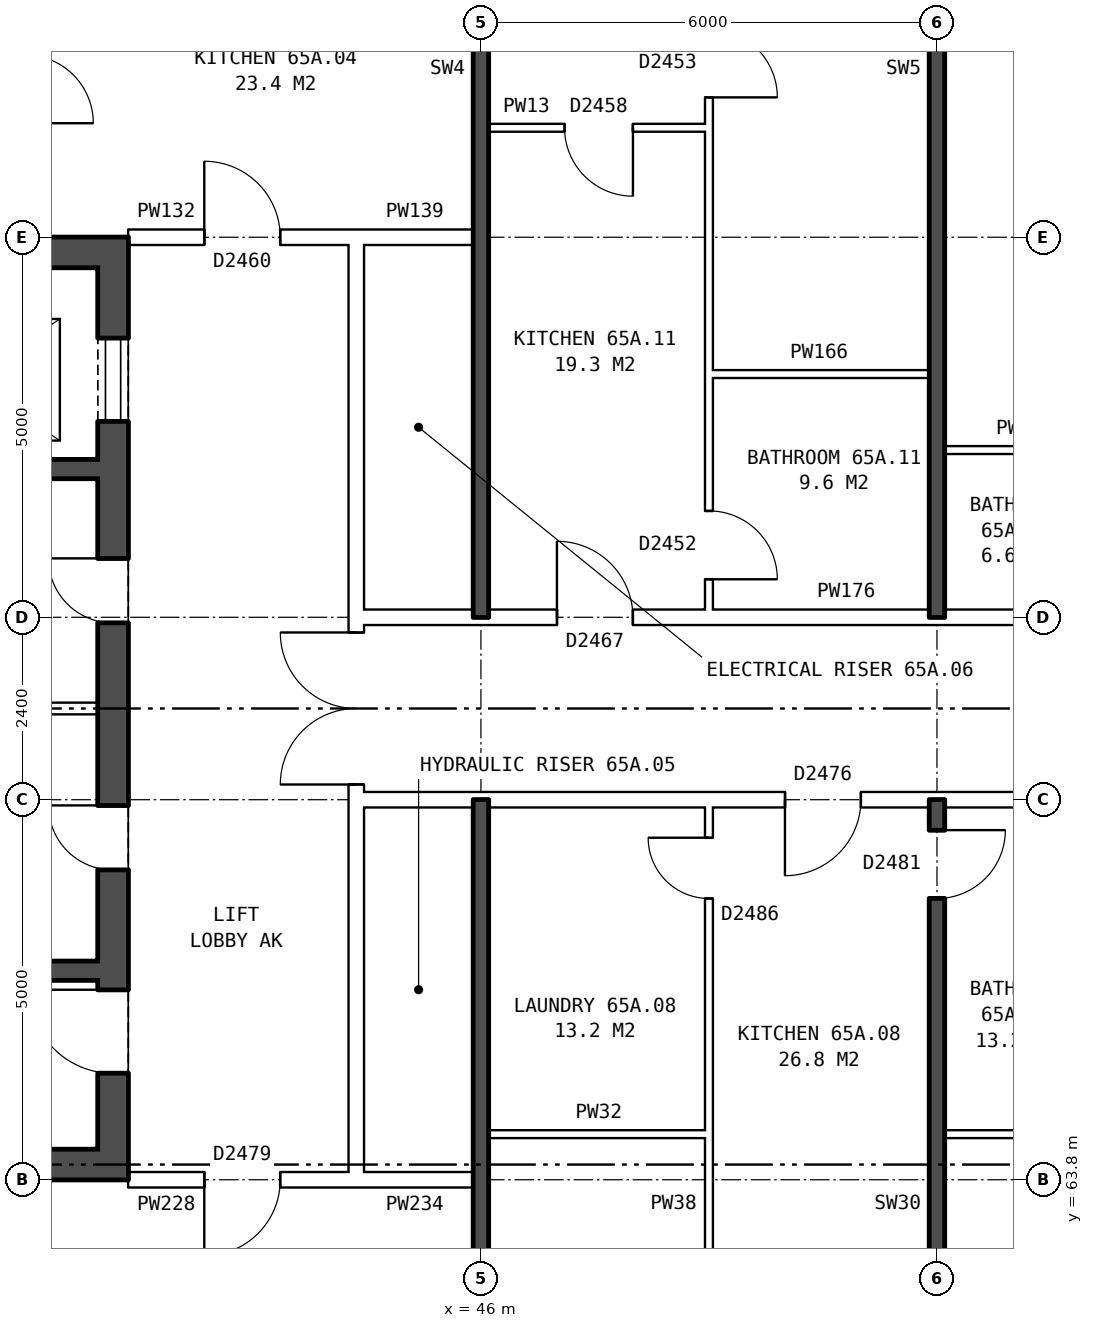
"""IFC4 building model, lengths in metres.
Left out: names, types, materials, properties, quantities, classifications, styles, units other than length and angle.
Written with IfcOpenShell. Run it as: python <this file> out.ifc"""

import sys

from ifc_helpers import new_model, si_unit, direction, frame, frame_2d, origin, place, context, subcontext, project, spatial, rectangle, extrude, element, fill, save


model = new_model("IFC4")
c1 = context("Model", 3, precision=1e-05, world=origin(), true_north=direction((0.0, 1.0)))
c2 = subcontext(c1, "Body", "Model", "MODEL_VIEW")
j1 = project(units=[si_unit("LENGTHUNIT", "METRE"), si_unit("PLANEANGLEUNIT", "RADIAN")], contexts=[c1])
p1 = place(None, origin())
s1 = spatial("IfcSite", under=j1, at=p1, CompositionType="ELEMENT")
p2 = place(p1, origin())
s2 = spatial("IfcBuilding", under=s1, at=p2, CompositionType="ELEMENT")
p3 = place(p2, frame((0.0, 0.0, 230.7)))
s3 = spatial("IfcBuildingStorey", under=s2, at=p3, CompositionType="ELEMENT", Elevation=230.7)
p4 = place(p3, frame((41.16, 76.2, 0.0), z_axis=(0.0, 0.0, 1.0), x_axis=(0.0, -1.0, 0.0)))
e1 = element("IfcWall", 1, at=p4, inside=s3, PredefinedType="SHEAR", context=c2, shape_type="SweptSolid", body=[
    extrude(rectangle(XDim=12.4, YDim=0.4, at=frame_2d((6.2, 0.0))), origin(), (0.0, 0.0, 1.0), 2.85),
])
p5 = place(p4, frame((1.325, 0.0, 0.0)))
e2 = element("IfcOpeningElement", 2, at=p5, cuts=e1, PredefinedType="OPENING", context=c2, shape_type="SweptSolid", body=[
    extrude(rectangle(XDim=1.1, YDim=2.1, at=frame_2d((0.55, 1.05))), frame((0.0, 0.21, 0.0), z_axis=(0.0, -1.0, 0.0), x_axis=(1.0, 0.0, 0.0)), (0.0, 0.0, 1.0), 0.42),
])
p6 = place(p4, frame((4.225, 0.0, 0.0)))
e3 = element("IfcOpeningElement", 3, at=p6, cuts=e1, PredefinedType="OPENING", context=c2, shape_type="SweptSolid", body=[
    extrude(rectangle(XDim=0.85, YDim=2.1, at=frame_2d((0.425, 1.05))), frame((0.0, 0.21, 0.0), z_axis=(0.0, -1.0, 0.0), x_axis=(1.0, 0.0, 0.0)), (0.0, 0.0, 1.0), 0.42),
])
p7 = place(p4, frame((7.475, 0.0, 0.0)))
e4 = element("IfcOpeningElement", 4, at=p7, cuts=e1, PredefinedType="OPENING", context=c2, shape_type="SweptSolid", body=[
    extrude(rectangle(XDim=0.85, YDim=2.1, at=frame_2d((0.425, 1.05))), frame((0.0, 0.21, 0.0), z_axis=(0.0, -1.0, 0.0), x_axis=(1.0, 0.0, 0.0)), (0.0, 0.0, 1.0), 0.42),
])
p8 = place(p4, frame((9.9, 0.0, 0.0)))
e5 = element("IfcOpeningElement", 5, at=p8, cuts=e1, PredefinedType="OPENING", context=c2, shape_type="SweptSolid", body=[
    extrude(rectangle(XDim=1.1, YDim=2.1, at=frame_2d((0.55, 1.05))), frame((0.0, 0.21, 0.0), z_axis=(0.0, -1.0, 0.0), x_axis=(1.0, 0.0, 0.0)), (0.0, 0.0, 1.0), 0.42),
])
for number, where, z_axis, x_axis in (
    (6, (40.96, 76.0, 0.0), (0.0, 0.0, 1.0), (-1.0, 0.0, 0.0)),
    (7, (40.96, 64.0, 0.0), (0.0, 0.0, 1.0), (-1.0, 0.0, 0.0)),
):
    element("IfcWall", number, at=place(p3, frame(where, z_axis=z_axis, x_axis=x_axis)), inside=s3, PredefinedType="SHEAR", context=c2, shape_type="SweptSolid", body=[
        extrude(rectangle(XDim=8.2, YDim=0.4, at=frame_2d((4.1, 0.0))), origin(), (0.0, 0.0, 1.0), 2.85),
    ])
p9 = place(p3, frame((40.96, 73.15, 0.0), z_axis=(0.0, 0.0, 1.0), x_axis=(-1.0, 0.0, 0.0)))
e8 = element("IfcWall", 8, at=p9, inside=s3, PredefinedType="SHEAR", context=c2, shape_type="SweptSolid", body=[
    extrude(rectangle(XDim=3.595, YDim=0.25, at=frame_2d((1.797, 0.0))), origin(), (0.0, 0.0, 1.0), 2.85),
])
p10 = place(p3, frame((40.96, 70.0, 0.0), z_axis=(0.0, 0.0, 1.0), x_axis=(-1.0, 0.0, 0.0)))
e9 = element("IfcWall", 9, at=p10, inside=s3, PredefinedType="PARTITIONING", context=c2, shape_type="SweptSolid", body=[
    extrude(rectangle(XDim=2.525, YDim=0.15, at=frame_2d((1.262, 0.0))), origin(), (0.0, 0.0, 1.0), 2.85),
])
p11 = place(p3, frame((40.96, 66.55, 0.0), z_axis=(0.0, 0.0, 1.0), x_axis=(-1.0, 0.0, 0.0)))
e10 = element("IfcWall", 10, at=p11, inside=s3, PredefinedType="SHEAR", context=c2, shape_type="SweptSolid", body=[
    extrude(rectangle(XDim=2.525, YDim=0.25, at=frame_2d((1.262, 0.0))), origin(), (0.0, 0.0, 1.0), 2.85),
])
p12 = place(p3, frame((44.36, 63.9, 0.0), z_axis=(0.0, 0.0, 1.0), x_axis=(0.0, 1.0, 0.0)))
e11 = element("IfcWall", 11, at=p12, inside=s3, PredefinedType="PARTITIONING", context=c2, shape_type="SweptSolid", body=[
    extrude(rectangle(XDim=12.2, YDim=0.2, at=frame_2d((6.1, 0.0))), origin(), (0.0, 0.0, 1.0), 2.85),
])
p13 = place(p12, frame((5.1, 0.0, 0.0)))
e12 = element("IfcOpeningElement", 12, at=p13, cuts=e11, PredefinedType="OPENING", context=c2, shape_type="SweptSolid", body=[
    extrude(rectangle(XDim=2.0, YDim=2.1, at=frame_2d((1.0, 1.05))), frame((0.0, 0.11, 0.0), z_axis=(0.0, -1.0, 0.0), x_axis=(1.0, 0.0, 0.0)), (0.0, 0.0, 1.0), 0.22),
])
p14 = place(p3, frame((41.36, 63.8, 0.0), z_axis=(0.0, 0.0, 1.0), x_axis=(1.0, 0.0, 0.0)))
e13 = element("IfcWall", 13, at=p14, inside=s3, PredefinedType="PARTITIONING", context=c2, shape_type="SweptSolid", body=[
    extrude(rectangle(XDim=3.0, YDim=0.2, at=frame_2d((1.5, 0.0))), origin(), (0.0, 0.0, 1.0), 2.85),
])
p15 = place(p14, frame((1.0, 0.0, 0.0)))
e14 = element("IfcOpeningElement", 14, at=p15, cuts=e13, PredefinedType="OPENING", context=c2, shape_type="SweptSolid", body=[
    extrude(rectangle(XDim=1.0, YDim=2.1, at=frame_2d((0.5, 1.05))), frame((0.0, 0.11, 0.0), z_axis=(0.0, -1.0, 0.0), x_axis=(1.0, 0.0, 0.0)), (0.0, 0.0, 1.0), 0.22),
])
p16 = place(p3, frame((44.36, 63.8, 0.0), z_axis=(0.0, 0.0, 1.0), x_axis=(1.0, 0.0, 0.0)))
e15 = element("IfcWall", 15, at=p16, inside=s3, PredefinedType="PARTITIONING", context=c2, shape_type="SweptSolid", body=[
    extrude(rectangle(XDim=1.54, YDim=0.2, at=frame_2d((0.77, 0.0))), origin(), (0.0, 0.0, 1.0), 2.85),
])
p17 = place(p3, frame((46.1, 64.4, 0.0), z_axis=(0.0, 0.0, 1.0), x_axis=(1.0, 0.0, 0.0)))
e16 = element("IfcWall", 16, at=p17, inside=s3, PredefinedType="PARTITIONING", context=c2, shape_type="SweptSolid", body=[
    extrude(rectangle(XDim=2.9, YDim=0.1, at=frame_2d((1.45, 0.0))), origin(), (0.0, 0.0, 1.0), 2.85),
])
p18 = place(p3, frame((52.1, 64.4, 0.0), z_axis=(0.0, 0.0, 1.0), x_axis=(1.0, 0.0, 0.0)))
e17 = element("IfcWall", 17, at=p18, inside=s3, PredefinedType="PARTITIONING", context=c2, shape_type="SweptSolid", body=[
    extrude(rectangle(XDim=2.8, YDim=0.1, at=frame_2d((1.4, 0.0))), origin(), (0.0, 0.0, 1.0), 2.85),
])
p19 = place(p3, frame((44.36, 68.8, 0.0), z_axis=(0.0, 0.0, 1.0), x_axis=(1.0, 0.0, 0.0)))
e18 = element("IfcWall", 18, at=p19, inside=s3, PredefinedType="PARTITIONING", context=c2, shape_type="SweptSolid", body=[
    extrude(rectangle(XDim=19.28, YDim=0.2, at=frame_2d((9.64, 0.0))), origin(), (0.0, 0.0, 1.0), 2.85),
])
p20 = place(p19, frame((14.64, 0.0, 0.0)))
e19 = element("IfcOpeningElement", 19, at=p20, cuts=e18, PredefinedType="OPENING", context=c2, shape_type="SweptSolid", body=[
    extrude(rectangle(XDim=1.0, YDim=2.1, at=frame_2d((0.5, 1.05))), frame((0.0, 0.11, 0.0), z_axis=(0.0, -1.0, 0.0), x_axis=(1.0, 0.0, 0.0)), (0.0, 0.0, 1.0), 0.22),
])
p21 = place(p19, frame((5.64, 0.0, 0.0)))
e20 = element("IfcOpeningElement", 20, at=p21, cuts=e18, PredefinedType="OPENING", context=c2, shape_type="SweptSolid", body=[
    extrude(rectangle(XDim=1.0, YDim=2.1, at=frame_2d((0.5, 1.05))), frame((0.0, 0.11, 0.0), z_axis=(0.0, -1.0, 0.0), x_axis=(1.0, 0.0, 0.0)), (0.0, 0.0, 1.0), 0.22),
])
p22 = place(p3, frame((44.36, 71.2, 0.0), z_axis=(0.0, 0.0, 1.0), x_axis=(1.0, 0.0, 0.0)))
e21 = element("IfcWall", 21, at=p22, inside=s3, PredefinedType="PARTITIONING", context=c2, shape_type="SweptSolid", body=[
    extrude(rectangle(XDim=19.28, YDim=0.2, at=frame_2d((9.64, 0.0))), origin(), (0.0, 0.0, 1.0), 2.85),
])
p23 = place(p22, frame((14.64, 0.0, 0.0)))
e22 = element("IfcOpeningElement", 22, at=p23, cuts=e21, PredefinedType="OPENING", context=c2, shape_type="SweptSolid", body=[
    extrude(rectangle(XDim=1.0, YDim=2.1, at=frame_2d((0.5, 1.05))), frame((0.0, 0.11, 0.0), z_axis=(0.0, -1.0, 0.0), x_axis=(1.0, 0.0, 0.0)), (0.0, 0.0, 1.0), 0.22),
])
p24 = place(p22, frame((11.64, 0.0, 0.0)))
e23 = element("IfcOpeningElement", 23, at=p24, cuts=e21, PredefinedType="OPENING", context=c2, shape_type="SweptSolid", body=[
    extrude(rectangle(XDim=1.0, YDim=2.1, at=frame_2d((0.5, 1.05))), frame((0.0, 0.11, 0.0), z_axis=(0.0, -1.0, 0.0), x_axis=(1.0, 0.0, 0.0)), (0.0, 0.0, 1.0), 0.22),
])
p25 = place(p22, frame((2.64, 0.0, 0.0)))
e24 = element("IfcOpeningElement", 24, at=p25, cuts=e21, PredefinedType="OPENING", context=c2, shape_type="SweptSolid", body=[
    extrude(rectangle(XDim=1.0, YDim=2.1, at=frame_2d((0.5, 1.05))), frame((0.0, 0.11, 0.0), z_axis=(0.0, -1.0, 0.0), x_axis=(1.0, 0.0, 0.0)), (0.0, 0.0, 1.0), 0.22),
])
for number, where, z_axis, x_axis in (
    (25, (52.1, 73.4, 0.0), (0.0, 0.0, 1.0), (1.0, 0.0, 0.0)),
    (26, (49.0, 74.4, 0.0), (0.0, 0.0, 1.0), (1.0, 0.0, 0.0)),
):
    element("IfcWall", number, at=place(p3, frame(where, z_axis=z_axis, x_axis=x_axis)), inside=s3, PredefinedType="PARTITIONING", context=c2, shape_type="SweptSolid", body=[
        extrude(rectangle(XDim=2.9, YDim=0.1, at=frame_2d((1.45, 0.0))), origin(), (0.0, 0.0, 1.0), 2.85),
    ])
p26 = place(p3, frame((41.36, 76.2, 0.0), z_axis=(0.0, 0.0, 1.0), x_axis=(1.0, 0.0, 0.0)))
e27 = element("IfcWall", 27, at=p26, inside=s3, PredefinedType="PARTITIONING", context=c2, shape_type="SweptSolid", body=[
    extrude(rectangle(XDim=3.0, YDim=0.2, at=frame_2d((1.5, 0.0))), origin(), (0.0, 0.0, 1.0), 2.85),
])
p27 = place(p26, frame((1.0, 0.0, 0.0)))
e28 = element("IfcOpeningElement", 28, at=p27, cuts=e27, PredefinedType="OPENING", context=c2, shape_type="SweptSolid", body=[
    extrude(rectangle(XDim=1.0, YDim=2.1, at=frame_2d((0.5, 1.05))), frame((0.0, 0.11, 0.0), z_axis=(0.0, -1.0, 0.0), x_axis=(1.0, 0.0, 0.0)), (0.0, 0.0, 1.0), 0.22),
])
p28 = place(p3, frame((44.36, 76.2, 0.0), z_axis=(0.0, 0.0, 1.0), x_axis=(1.0, 0.0, 0.0)))
e29 = element("IfcWall", 29, at=p28, inside=s3, PredefinedType="PARTITIONING", context=c2, shape_type="SweptSolid", body=[
    extrude(rectangle(XDim=1.54, YDim=0.2, at=frame_2d((0.77, 0.0))), origin(), (0.0, 0.0, 1.0), 2.85),
])
p29 = place(p3, frame((46.1, 77.64, 0.0), z_axis=(0.0, 0.0, 1.0), x_axis=(1.0, 0.0, 0.0)))
e30 = element("IfcWall", 30, at=p29, inside=s3, PredefinedType="PARTITIONING", context=c2, shape_type="SweptSolid", body=[
    extrude(rectangle(XDim=2.9, YDim=0.1, at=frame_2d((1.45, 0.0))), origin(), (0.0, 0.0, 1.0), 2.85),
])
p30 = place(p29, frame((1.0, 0.0, 0.0)))
e31 = element("IfcOpeningElement", 31, at=p30, cuts=e30, PredefinedType="OPENING", context=c2, shape_type="SweptSolid", body=[
    extrude(rectangle(XDim=0.9, YDim=2.1, at=frame_2d((0.45, 1.05))), frame((0.0, 0.06, 0.0), z_axis=(0.0, -1.0, 0.0), x_axis=(1.0, 0.0, 0.0)), (0.0, 0.0, 1.0), 0.12),
])
for number, where, z_axis, x_axis in (
    (32, (46.0, 54.36, 0.0), (0.0, 0.0, 1.0), (0.0, 1.0, 0.0)),
    (33, (46.0, 71.2, 0.0), (0.0, 0.0, 1.0), (0.0, 1.0, 0.0)),
):
    element("IfcWall", number, at=place(p3, frame(where, z_axis=z_axis, x_axis=x_axis)), inside=s3, PredefinedType="SOLIDWALL", context=c2, shape_type="SweptSolid", body=[
        extrude(rectangle(XDim=14.44, YDim=0.2, at=frame_2d((7.22, 0.0))), origin(), (0.0, 0.0, 1.0), 2.85),
    ])
p31 = place(p3, frame((49.0, 54.36, 0.0), z_axis=(0.0, 0.0, 1.0), x_axis=(0.0, 1.0, 0.0)))
e34 = element("IfcWall", 34, at=p31, inside=s3, PredefinedType="PARTITIONING", context=c2, shape_type="SweptSolid", body=[
    extrude(rectangle(XDim=14.34, YDim=0.1, at=frame_2d((7.17, 0.0))), origin(), (0.0, 0.0, 1.0), 2.85),
])
p32 = place(p31, frame((4.2, 0.0, 0.0)))
e35 = element("IfcOpeningElement", 35, at=p32, cuts=e34, PredefinedType="OPENING", context=c2, shape_type="SweptSolid", body=[
    extrude(rectangle(XDim=0.9, YDim=2.1, at=frame_2d((0.45, 1.05))), frame((0.0, 0.06, 0.0), z_axis=(0.0, -1.0, 0.0), x_axis=(1.0, 0.0, 0.0)), (0.0, 0.0, 1.0), 0.12),
])
p33 = place(p31, frame((13.14, 0.0, 0.0)))
e36 = element("IfcOpeningElement", 36, at=p33, cuts=e34, PredefinedType="OPENING", context=c2, shape_type="SweptSolid", body=[
    extrude(rectangle(XDim=0.8, YDim=2.1, at=frame_2d((0.4, 1.05))), frame((0.0, 0.06, 0.0), z_axis=(0.0, -1.0, 0.0), x_axis=(1.0, 0.0, 0.0)), (0.0, 0.0, 1.0), 0.12),
])
p34 = place(p3, frame((49.0, 71.3, 0.0), z_axis=(0.0, 0.0, 1.0), x_axis=(0.0, 1.0, 0.0)))
e37 = element("IfcWall", 37, at=p34, inside=s3, PredefinedType="PARTITIONING", context=c2, shape_type="SweptSolid", body=[
    extrude(rectangle(XDim=14.34, YDim=0.1, at=frame_2d((7.17, 0.0))), origin(), (0.0, 0.0, 1.0), 2.85),
])
p35 = place(p34, frame((6.74, 0.0, 0.0)))
e38 = element("IfcOpeningElement", 38, at=p35, cuts=e37, PredefinedType="OPENING", context=c2, shape_type="SweptSolid", body=[
    extrude(rectangle(XDim=0.9, YDim=2.1, at=frame_2d((0.45, 1.05))), frame((0.0, 0.06, 0.0), z_axis=(0.0, -1.0, 0.0), x_axis=(1.0, 0.0, 0.0)), (0.0, 0.0, 1.0), 0.12),
])
p36 = place(p34, frame((0.4, 0.0, 0.0)))
e39 = element("IfcOpeningElement", 39, at=p36, cuts=e37, PredefinedType="OPENING", context=c2, shape_type="SweptSolid", body=[
    extrude(rectangle(XDim=0.9, YDim=2.1, at=frame_2d((0.45, 1.05))), frame((0.0, 0.06, 0.0), z_axis=(0.0, -1.0, 0.0), x_axis=(1.0, 0.0, 0.0)), (0.0, 0.0, 1.0), 0.12),
])
p37 = place(p3, frame((52.0, 54.36, 0.0), z_axis=(0.0, 0.0, 1.0), x_axis=(0.0, 1.0, 0.0)))
e40 = element("IfcWall", 40, at=p37, inside=s3, PredefinedType="SOLIDWALL", context=c2, shape_type="SweptSolid", body=[
    extrude(rectangle(XDim=14.44, YDim=0.2, at=frame_2d((7.22, 0.0))), origin(), (0.0, 0.0, 1.0), 2.85),
])
p38 = place(p37, frame((4.2, 0.0, 0.0)))
e41 = element("IfcOpeningElement", 41, at=p38, cuts=e40, PredefinedType="OPENING", context=c2, shape_type="SweptSolid", body=[
    extrude(rectangle(XDim=0.9, YDim=2.1, at=frame_2d((0.45, 1.05))), frame((0.0, 0.11, 0.0), z_axis=(0.0, -1.0, 0.0), x_axis=(1.0, 0.0, 0.0)), (0.0, 0.0, 1.0), 0.22),
])
p39 = place(p37, frame((13.14, 0.0, 0.0)))
e42 = element("IfcOpeningElement", 42, at=p39, cuts=e40, PredefinedType="OPENING", context=c2, shape_type="SweptSolid", body=[
    extrude(rectangle(XDim=0.9, YDim=2.1, at=frame_2d((0.45, 1.05))), frame((0.0, 0.11, 0.0), z_axis=(0.0, -1.0, 0.0), x_axis=(1.0, 0.0, 0.0)), (0.0, 0.0, 1.0), 0.22),
])
p40 = place(p3, frame((52.0, 71.2, 0.0), z_axis=(0.0, 0.0, 1.0), x_axis=(0.0, 1.0, 0.0)))
e43 = element("IfcWall", 43, at=p40, inside=s3, PredefinedType="SOLIDWALL", context=c2, shape_type="SweptSolid", body=[
    extrude(rectangle(XDim=14.44, YDim=0.2, at=frame_2d((7.22, 0.0))), origin(), (0.0, 0.0, 1.0), 2.85),
])
p41 = place(p5, origin())
e44 = element("IfcDoor", 44, at=p41, inside=s3, OperationType="DOUBLE_DOOR_SLIDING", PredefinedType="DOOR", context=c2, shape_type="SweptSolid", body=[
    extrude(rectangle(XDim=1.1, YDim=2.1, at=frame_2d((0.55, 1.05))), frame((0.0, -0.135, 0.0), z_axis=(0.0, -1.0, 0.0), x_axis=(1.0, 0.0, 0.0)), (0.0, 0.0, 1.0), 0.05),
])
fill(e2, e44)
p42 = place(p6, frame((0.85, 0.0, 0.0), z_axis=(0.0, 0.0, 1.0), x_axis=(-1.0, 0.0, 0.0)))
e45 = element("IfcDoor", 45, at=p42, inside=s3, OperationType="SINGLE_SWING_RIGHT", PredefinedType="DOOR", context=c2, shape_type="SweptSolid", body=[
    extrude(rectangle(XDim=0.85, YDim=2.1, at=frame_2d((0.425, 1.05))), frame((0.0, 0.185, 0.0), z_axis=(0.0, -1.0, 0.0), x_axis=(1.0, 0.0, 0.0)), (0.0, 0.0, 1.0), 0.05),
])
fill(e3, e45)
p43 = place(p7, frame((0.85, 0.0, 0.0), z_axis=(0.0, 0.0, 1.0), x_axis=(-1.0, 0.0, 0.0)))
e46 = element("IfcDoor", 46, at=p43, inside=s3, OperationType="SINGLE_SWING_RIGHT", PredefinedType="DOOR", context=c2, shape_type="SweptSolid", body=[
    extrude(rectangle(XDim=0.85, YDim=2.1, at=frame_2d((0.425, 1.05))), frame((0.0, 0.185, 0.0), z_axis=(0.0, -1.0, 0.0), x_axis=(1.0, 0.0, 0.0)), (0.0, 0.0, 1.0), 0.05),
])
fill(e4, e46)
p44 = place(p8, frame((1.1, 0.0, 0.0), z_axis=(0.0, 0.0, 1.0), x_axis=(-1.0, 0.0, 0.0)))
e47 = element("IfcDoor", 47, at=p44, inside=s3, OperationType="SINGLE_SWING_RIGHT", PredefinedType="DOOR", context=c2, shape_type="SweptSolid", body=[
    extrude(rectangle(XDim=1.1, YDim=2.1, at=frame_2d((0.55, 1.05))), frame((0.0, 0.185, 0.0), z_axis=(0.0, -1.0, 0.0), x_axis=(1.0, 0.0, 0.0)), (0.0, 0.0, 1.0), 0.05),
])
fill(e5, e47)
p45 = place(p13, origin())
e48 = element("IfcDoor", 48, at=p45, inside=s3, OperationType="DOUBLE_DOOR_SINGLE_SWING", PredefinedType="DOOR", context=c2, shape_type="SweptSolid", body=[
    extrude(rectangle(XDim=2.0, YDim=2.1, at=frame_2d((1.0, 1.05))), frame((0.0, 0.025, 0.0), z_axis=(0.0, -1.0, 0.0), x_axis=(1.0, 0.0, 0.0)), (0.0, 0.0, 1.0), 0.05),
])
fill(e12, e48)
p46 = place(p15, frame((1.0, 0.0, 0.0), z_axis=(0.0, 0.0, 1.0), x_axis=(-1.0, 0.0, 0.0)))
e49 = element("IfcDoor", 49, at=p46, inside=s3, OperationType="SINGLE_SWING_RIGHT", PredefinedType="DOOR", context=c2, shape_type="SweptSolid", body=[
    extrude(rectangle(XDim=1.0, YDim=2.1, at=frame_2d((0.5, 1.05))), frame((0.0, 0.025, 0.0), z_axis=(0.0, -1.0, 0.0), x_axis=(1.0, 0.0, 0.0)), (0.0, 0.0, 1.0), 0.05),
])
fill(e14, e49)
p47 = place(p27, origin())
e50 = element("IfcDoor", 50, at=p47, inside=s3, OperationType="SINGLE_SWING_LEFT", PredefinedType="DOOR", context=c2, shape_type="SweptSolid", body=[
    extrude(rectangle(XDim=1.0, YDim=2.1, at=frame_2d((0.5, 1.05))), frame((0.0, 0.025, 0.0), z_axis=(0.0, -1.0, 0.0), x_axis=(1.0, 0.0, 0.0)), (0.0, 0.0, 1.0), 0.05),
])
fill(e28, e50)
p48 = place(p21, frame((1.0, 0.0, 0.0), z_axis=(0.0, 0.0, 1.0), x_axis=(-1.0, 0.0, 0.0)))
e51 = element("IfcDoor", 51, at=p48, inside=s3, OperationType="SINGLE_SWING_RIGHT", PredefinedType="DOOR", context=c2, shape_type="SweptSolid", body=[
    extrude(rectangle(XDim=1.0, YDim=2.1, at=frame_2d((0.5, 1.05))), frame((0.0, 0.025, 0.0), z_axis=(0.0, -1.0, 0.0), x_axis=(1.0, 0.0, 0.0)), (0.0, 0.0, 1.0), 0.05),
])
fill(e20, e51)
p49 = place(p39, frame((0.9, 0.0, 0.0), z_axis=(0.0, 0.0, 1.0), x_axis=(-1.0, 0.0, 0.0)))
e52 = element("IfcDoor", 52, at=p49, inside=s3, OperationType="SINGLE_SWING_LEFT", PredefinedType="DOOR", context=c2, shape_type="SweptSolid", body=[
    extrude(rectangle(XDim=0.9, YDim=2.1, at=frame_2d((0.45, 1.05))), frame((0.0, 0.025, 0.0), z_axis=(0.0, -1.0, 0.0), x_axis=(1.0, 0.0, 0.0)), (0.0, 0.0, 1.0), 0.05),
])
fill(e42, e52)
p50 = place(p33, origin())
e53 = element("IfcDoor", 53, at=p50, inside=s3, OperationType="SINGLE_SWING_RIGHT", PredefinedType="DOOR", context=c2, shape_type="SweptSolid", body=[
    extrude(rectangle(XDim=0.8, YDim=2.1, at=frame_2d((0.4, 1.05))), frame((0.0, 0.025, 0.0), z_axis=(0.0, -1.0, 0.0), x_axis=(1.0, 0.0, 0.0)), (0.0, 0.0, 1.0), 0.05),
])
fill(e36, e53)
p51 = place(p35, frame((0.9, 0.0, 0.0), z_axis=(0.0, 0.0, 1.0), x_axis=(-1.0, 0.0, 0.0)))
e54 = element("IfcDoor", 54, at=p51, inside=s3, OperationType="SINGLE_SWING_RIGHT", PredefinedType="DOOR", context=c2, shape_type="SweptSolid", body=[
    extrude(rectangle(XDim=0.9, YDim=2.1, at=frame_2d((0.45, 1.05))), frame((0.0, 0.025, 0.0), z_axis=(0.0, -1.0, 0.0), x_axis=(1.0, 0.0, 0.0)), (0.0, 0.0, 1.0), 0.05),
])
fill(e38, e54)
p52 = place(p25, origin())
e55 = element("IfcDoor", 55, at=p52, inside=s3, OperationType="SINGLE_SWING_LEFT", PredefinedType="DOOR", context=c2, shape_type="SweptSolid", body=[
    extrude(rectangle(XDim=1.0, YDim=2.1, at=frame_2d((0.5, 1.05))), frame((0.0, 0.025, 0.0), z_axis=(0.0, -1.0, 0.0), x_axis=(1.0, 0.0, 0.0)), (0.0, 0.0, 1.0), 0.05),
])
fill(e24, e55)
p53 = place(p30, frame((0.9, 0.0, 0.0), z_axis=(0.0, 0.0, 1.0), x_axis=(-1.0, 0.0, 0.0)))
e56 = element("IfcDoor", 56, at=p53, inside=s3, OperationType="SINGLE_SWING_LEFT", PredefinedType="DOOR", context=c2, shape_type="SweptSolid", body=[
    extrude(rectangle(XDim=0.9, YDim=2.1, at=frame_2d((0.45, 1.05))), frame((0.0, 0.025, 0.0), z_axis=(0.0, -1.0, 0.0), x_axis=(1.0, 0.0, 0.0)), (0.0, 0.0, 1.0), 0.05),
])
fill(e31, e56)
p54 = place(p36, frame((0.9, 0.0, 0.0), z_axis=(0.0, 0.0, 1.0), x_axis=(-1.0, 0.0, 0.0)))
e57 = element("IfcDoor", 57, at=p54, inside=s3, OperationType="SINGLE_SWING_RIGHT", PredefinedType="DOOR", context=c2, shape_type="SweptSolid", body=[
    extrude(rectangle(XDim=0.9, YDim=2.1, at=frame_2d((0.45, 1.05))), frame((0.0, 0.025, 0.0), z_axis=(0.0, -1.0, 0.0), x_axis=(1.0, 0.0, 0.0)), (0.0, 0.0, 1.0), 0.05),
])
fill(e39, e57)
save(model, sys.argv[1])
